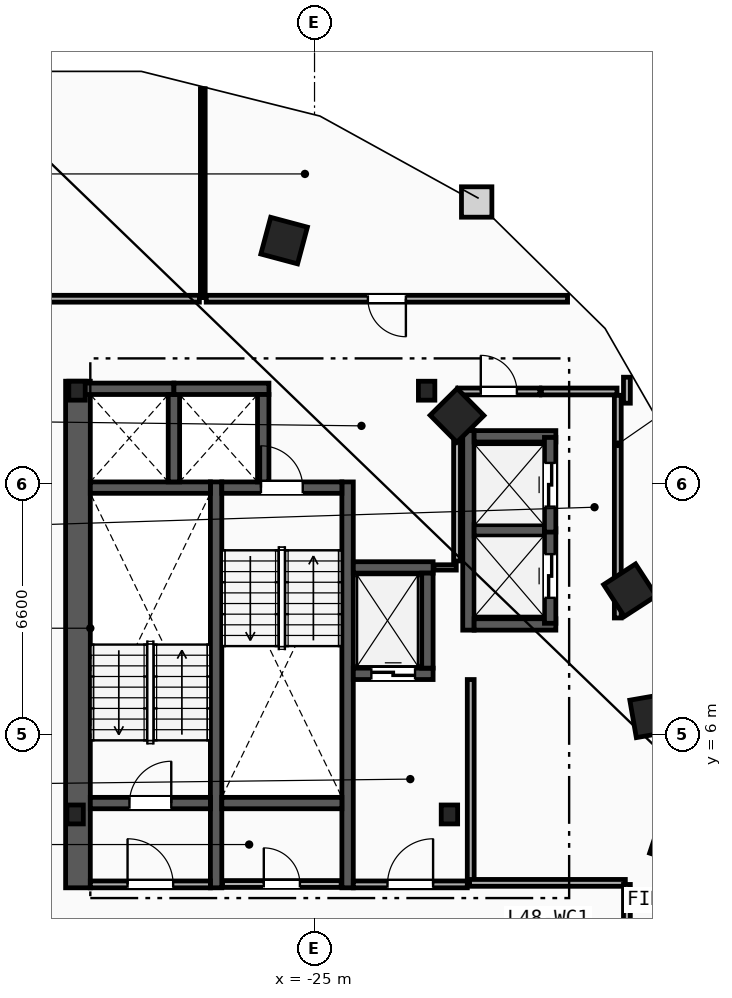
"""IFC4 building model, lengths in metres.
Left out: names, types, materials, properties, quantities, classifications, styles, units other than length and angle.
Written with IfcOpenShell. Run it as: python <this file> out.ifc"""

import sys

from ifc_helpers import new_model, si_unit, direction, frame, frame_2d, origin, origin_2d, place, context, subcontext, project, spatial, rectangle, i_section, extrude, element, fill, save


model = new_model("IFC4")
c1 = context("Model", 3, precision=1e-05, world=origin(), true_north=direction((0.0, 1.0)))
c2 = subcontext(c1, "Body", "Model", "MODEL_VIEW")
j1 = project(units=[si_unit("LENGTHUNIT", "METRE"), si_unit("PLANEANGLEUNIT", "RADIAN")], contexts=[c1])
p1 = place(None, origin())
s1 = spatial("IfcSite", under=j1, at=p1, CompositionType="ELEMENT")
p2 = place(p1, origin())
s2 = spatial("IfcBuilding", under=s1, at=p2, CompositionType="ELEMENT")
p3 = place(p2, frame((0.0, 0.0, 183.6)))
s3 = spatial("IfcBuildingStorey", under=s2, at=p3, CompositionType="ELEMENT", Elevation=183.6)
for number, where, z_axis, x_axis in (
    (1, (-31.3, 3.9, 0.0), (0.0, 0.0, 1.0), (1.0, 0.0, 0.0)),
    (2, (-21.45, 3.9, 0.0), (0.0, 0.0, 1.0), (1.0, 0.0, 0.0)),
    (3, (-22.05, 15.05, 0.0), (0.0, 0.0, 1.0), (1.0, 0.0, 0.0)),
    (4, (-31.25, 15.05, 0.0), (0.0, 0.0, 1.0), (1.0, 0.0, 0.0)),
):
    element("IfcColumn", number, at=place(p3, frame(where, z_axis=z_axis, x_axis=x_axis)), inside=s3, PredefinedType="COLUMN", context=c2, shape_type="SweptSolid", body=[
        extrude(i_section(OverallWidth=0.432, OverallDepth=0.498, WebThickness=0.056, FlangeThickness=0.089, FilletRadius=0.018, at=origin_2d()), origin(), (0.0, 0.0, 1.0), 3.6),
    ])
for number, where, z_axis, x_axis in (
    (5, (-15.55, 3.2, 0.0), (0.0, 0.0, 1.0), (0.315, 0.949, 0.0)),
    (6, (-16.125, 6.5, 0.0), (0.0, 0.0, 1.0), (-0.172, 0.985, 0.0)),
    (7, (-16.7, 9.8, 0.0), (0.0, 0.0, 1.0), (-0.544, 0.839, 0.0)),
    (8, (-21.25, 14.4, 0.0), (0.0, 0.0, 1.0), (-0.703, 0.711, 0.0)),
    (9, (-25.8, 19.0, 0.0), (0.0, 0.0, 1.0), (-0.966, 0.259, 0.0)),
):
    element("IfcColumn", number, at=place(p3, frame(where, z_axis=z_axis, x_axis=x_axis)), inside=s3, PredefinedType="COLUMN", context=c2, shape_type="SweptSolid", body=[
        extrude(rectangle(XDim=1.0, YDim=1.0, at=origin_2d()), origin(), (0.0, 0.0, 1.0), 3.6),
    ])
p4 = place(p3, frame((-31.225, 1.97, 0.0), z_axis=(0.0, 0.0, 1.0), x_axis=(0.0, 1.0, 0.0)))
e10 = element("IfcWall", 10, at=p4, inside=s3, PredefinedType="SHEAR", context=c2, shape_type="SweptSolid", body=[
    extrude(rectangle(XDim=13.33, YDim=0.65, at=frame_2d((6.665, 0.0))), origin(), (0.0, 0.0, 1.0), 3.32),
])
for number, where, z_axis, x_axis in (
    (11, (-27.59, 1.97, 0.0), (0.0, 0.0, 1.0), (0.0, 1.0, 0.0)),
    (12, (-24.13, 1.97, 0.0), (0.0, 0.0, 1.0), (0.0, 1.0, 0.0)),
):
    element("IfcWall", number, at=place(p3, frame(where, z_axis=z_axis, x_axis=x_axis)), inside=s3, PredefinedType="SHEAR", context=c2, shape_type="SweptSolid", body=[
        extrude(rectangle(XDim=10.68, YDim=0.3, at=frame_2d((5.34, 0.0))), origin(), (0.0, 0.0, 1.0), 3.32),
    ])
p5 = place(p3, frame((-30.9, 4.2, 0.0), z_axis=(0.0, 0.0, 1.0), x_axis=(1.0, 0.0, 0.0)))
e13 = element("IfcWall", 13, at=p5, inside=s3, PredefinedType="SHEAR", context=c2, shape_type="SweptSolid", body=[
    extrude(rectangle(XDim=3.16, YDim=0.3, at=frame_2d((1.58, 0.0))), origin(), (0.0, 0.0, 1.0), 3.32),
])
p6 = place(p5, frame((1.03, 0.0, 0.0)))
e14 = element("IfcOpeningElement", 14, at=p6, cuts=e13, PredefinedType="OPENING", context=c2, shape_type="SweptSolid", body=[
    extrude(rectangle(XDim=1.1, YDim=2.15, at=frame_2d((0.55, 1.075))), frame((0.0, 0.16, 0.0), z_axis=(0.0, -1.0, 0.0), x_axis=(1.0, 0.0, 0.0)), (0.0, 0.0, 1.0), 0.32),
])
p7 = place(p3, frame((-30.9, 12.5, 0.0), z_axis=(0.0, 0.0, 1.0), x_axis=(1.0, 0.0, 0.0)))
e15 = element("IfcWall", 15, at=p7, inside=s3, PredefinedType="SHEAR", context=c2, shape_type="SweptSolid", body=[
    extrude(rectangle(XDim=3.16, YDim=0.3, at=frame_2d((1.58, 0.0))), origin(), (0.0, 0.0, 1.0), 3.32),
])
p8 = place(p3, frame((-27.44, 12.5, 0.0), z_axis=(0.0, 0.0, 1.0), x_axis=(1.0, 0.0, 0.0)))
e16 = element("IfcWall", 16, at=p8, inside=s3, PredefinedType="SHEAR", context=c2, shape_type="SweptSolid", body=[
    extrude(rectangle(XDim=3.16, YDim=0.3, at=frame_2d((1.58, 0.0))), origin(), (0.0, 0.0, 1.0), 3.32),
])
p9 = place(p8, frame((1.03, 0.0, 0.0)))
e17 = element("IfcOpeningElement", 17, at=p9, cuts=e16, PredefinedType="OPENING", context=c2, shape_type="SweptSolid", body=[
    extrude(rectangle(XDim=1.1, YDim=2.15, at=frame_2d((0.55, 1.075))), frame((0.0, 0.16, 0.0), z_axis=(0.0, -1.0, 0.0), x_axis=(1.0, 0.0, 0.0)), (0.0, 0.0, 1.0), 0.32),
])
p10 = place(p3, frame((-27.44, 4.2, 0.0), z_axis=(0.0, 0.0, 1.0), x_axis=(1.0, 0.0, 0.0)))
e18 = element("IfcWall", 18, at=p10, inside=s3, PredefinedType="SHEAR", context=c2, shape_type="SweptSolid", body=[
    extrude(rectangle(XDim=3.16, YDim=0.3, at=frame_2d((1.58, 0.0))), origin(), (0.0, 0.0, 1.0), 3.32),
])
p11 = place(p3, frame((-20.89, 2.15, 0.0), z_axis=(0.0, 0.0, 1.0), x_axis=(0.0, 1.0, 0.0)))
e19 = element("IfcWall", 19, at=p11, inside=s3, PredefinedType="PARTITIONING", context=c2, shape_type="SweptSolid", body=[
    extrude(rectangle(XDim=5.3, YDim=0.18, at=frame_2d((2.65, 0.0))), origin(), (0.0, 0.0, 1.0), 3.32),
])
p12 = place(p3, frame((-23.98, 2.06, 0.0), z_axis=(0.0, 0.0, 1.0), x_axis=(1.0, 0.0, 0.0)))
e20 = element("IfcWall", 20, at=p12, inside=s3, PredefinedType="PARTITIONING", context=c2, shape_type="SweptSolid", body=[
    extrude(rectangle(XDim=3.0, YDim=0.18, at=frame_2d((1.5, 0.0))), origin(), (0.0, 0.0, 1.0), 3.32),
])
p13 = place(p12, frame((0.9, 0.0, 0.0)))
e21 = element("IfcOpeningElement", 21, at=p13, cuts=e20, PredefinedType="OPENING", context=c2, shape_type="SweptSolid", body=[
    extrude(rectangle(XDim=1.2, YDim=2.15, at=frame_2d((0.6, 1.075))), frame((0.0, 0.1, 0.0), z_axis=(0.0, -1.0, 0.0), x_axis=(1.0, 0.0, 0.0)), (0.0, 0.0, 1.0), 0.2),
])
p14 = place(p3, frame((-30.9, 2.06, 0.0), z_axis=(0.0, 0.0, 1.0), x_axis=(1.0, 0.0, 0.0)))
e22 = element("IfcWall", 22, at=p14, inside=s3, PredefinedType="PARTITIONING", context=c2, shape_type="SweptSolid", body=[
    extrude(rectangle(XDim=3.16, YDim=0.18, at=frame_2d((1.58, 0.0))), origin(), (0.0, 0.0, 1.0), 3.32),
])
p15 = place(p14, frame((0.98, 0.0, 0.0)))
e23 = element("IfcOpeningElement", 23, at=p15, cuts=e22, PredefinedType="OPENING", context=c2, shape_type="SweptSolid", body=[
    extrude(rectangle(XDim=1.2, YDim=2.15, at=frame_2d((0.6, 1.075))), frame((0.0, 0.1, 0.0), z_axis=(0.0, -1.0, 0.0), x_axis=(1.0, 0.0, 0.0)), (0.0, 0.0, 1.0), 0.2),
])
p16 = place(p3, frame((-23.98, 7.6, 0.0), z_axis=(0.0, 0.0, 1.0), x_axis=(1.0, 0.0, 0.0)))
e24 = element("IfcWall", 24, at=p16, inside=s3, PredefinedType="SHEAR", context=c2, shape_type="SweptSolid", body=[
    extrude(rectangle(XDim=2.1, YDim=0.3, at=frame_2d((1.05, 0.0))), origin(), (0.0, 0.0, 1.0), 3.32),
])
p17 = place(p16, frame((0.475, 0.0, 0.0)))
e25 = element("IfcOpeningElement", 25, at=p17, cuts=e24, PredefinedType="OPENING", context=c2, shape_type="SweptSolid", body=[
    extrude(rectangle(XDim=1.15, YDim=2.2, at=frame_2d((0.575, 1.1))), frame((0.0, 0.16, 0.0), z_axis=(0.0, -1.0, 0.0), x_axis=(1.0, 0.0, 0.0)), (0.0, 0.0, 1.0), 0.32),
])
p18 = place(p3, frame((-23.98, 10.4, 0.0), z_axis=(0.0, 0.0, 1.0), x_axis=(1.0, 0.0, 0.0)))
e26 = element("IfcWall", 26, at=p18, inside=s3, PredefinedType="SHEAR", context=c2, shape_type="SweptSolid", body=[
    extrude(rectangle(XDim=2.1, YDim=0.3, at=frame_2d((1.05, 0.0))), origin(), (0.0, 0.0, 1.0), 3.32),
])
for number, where, z_axis, x_axis in (
    (27, (-22.03, 7.75, 0.0), (0.0, 0.0, 1.0), (0.0, 1.0, 0.0)),
    (28, (-31.2, 15.1, 0.0), (0.0, 0.0, 1.0), (1.0, 0.0, 0.0)),
):
    element("IfcWall", number, at=place(p3, frame(where, z_axis=z_axis, x_axis=x_axis)), inside=s3, PredefinedType="SHEAR", context=c2, shape_type="SweptSolid", body=[
        extrude(rectangle(XDim=2.5, YDim=0.3, at=frame_2d((1.25, 0.0))), origin(), (0.0, 0.0, 1.0), 3.32),
    ])
p19 = place(p3, frame((-28.7, 12.65, 0.0), z_axis=(0.0, 0.0, 1.0), x_axis=(0.0, 1.0, 0.0)))
e29 = element("IfcWall", 29, at=p19, inside=s3, PredefinedType="SHEAR", context=c2, shape_type="SweptSolid", body=[
    extrude(rectangle(XDim=2.3, YDim=0.3, at=frame_2d((1.15, 0.0))), origin(), (0.0, 0.0, 1.0), 3.32),
])
p20 = place(p3, frame((-28.7, 15.1, 0.0), z_axis=(0.0, 0.0, 1.0), x_axis=(1.0, 0.0, 0.0)))
e30 = element("IfcWall", 30, at=p20, inside=s3, PredefinedType="SHEAR", context=c2, shape_type="SweptSolid", body=[
    extrude(rectangle(XDim=2.5, YDim=0.3, at=frame_2d((1.25, 0.0))), origin(), (0.0, 0.0, 1.0), 3.32),
])
p21 = place(p3, frame((-26.35, 12.65, 0.0), z_axis=(0.0, 0.0, 1.0), x_axis=(0.0, 1.0, 0.0)))
e31 = element("IfcWall", 31, at=p21, inside=s3, PredefinedType="SHEAR", context=c2, shape_type="SweptSolid", body=[
    extrude(rectangle(XDim=2.3, YDim=0.3, at=frame_2d((1.15, 0.0))), origin(), (0.0, 0.0, 1.0), 3.32),
])
p22 = place(p3, frame((-20.95, 8.75, 0.0), z_axis=(0.0, 0.0, 1.0), x_axis=(0.0, 1.0, 0.0)))
e32 = element("IfcWall", 32, at=p22, inside=s3, PredefinedType="SHEAR", context=c2, shape_type="SweptSolid", body=[
    extrude(rectangle(XDim=5.25, YDim=0.3, at=frame_2d((2.625, 0.0))), origin(), (0.0, 0.0, 1.0), 3.32),
])
for number, where, z_axis, x_axis in (
    (33, (-20.8, 8.9, 0.0), (0.0, 0.0, 1.0), (1.0, 0.0, 0.0)),
    (34, (-20.8, 13.85, 0.0), (0.0, 0.0, 1.0), (1.0, 0.0, 0.0)),
):
    element("IfcWall", number, at=place(p3, frame(where, z_axis=z_axis, x_axis=x_axis)), inside=s3, PredefinedType="SHEAR", context=c2, shape_type="SweptSolid", body=[
        extrude(rectangle(XDim=2.15, YDim=0.3, at=frame_2d((1.075, 0.0))), origin(), (0.0, 0.0, 1.0), 3.32),
    ])
p23 = place(p3, frame((-20.8, 11.375, 0.0), z_axis=(0.0, 0.0, 1.0), x_axis=(1.0, 0.0, 0.0)))
e35 = element("IfcWall", 35, at=p23, inside=s3, PredefinedType="SHEAR", context=c2, shape_type="SweptSolid", body=[
    extrude(rectangle(XDim=1.85, YDim=0.3, at=frame_2d((0.925, 0.0))), origin(), (0.0, 0.0, 1.0), 3.32),
])
p24 = place(p3, frame((-18.8, 8.93, 0.0), z_axis=(0.0, 0.0, 1.0), x_axis=(0.0, 1.0, 0.0)))
e36 = element("IfcWall", 36, at=p24, inside=s3, PredefinedType="SHEAR", context=c2, shape_type="SweptSolid", body=[
    extrude(rectangle(XDim=2.49, YDim=0.3, at=frame_2d((1.245, 0.0))), origin(), (0.0, 0.0, 1.0), 3.32),
])
p25 = place(p24, frame((0.67, 0.0, 0.0)))
e37 = element("IfcOpeningElement", 37, at=p25, cuts=e36, PredefinedType="OPENING", context=c2, shape_type="SweptSolid", body=[
    extrude(rectangle(XDim=1.15, YDim=2.2, at=frame_2d((0.575, 1.1))), frame((0.0, 0.16, 0.0), z_axis=(0.0, -1.0, 0.0), x_axis=(1.0, 0.0, 0.0)), (0.0, 0.0, 1.0), 0.32),
])
p26 = place(p3, frame((-18.8, 11.33, 0.0), z_axis=(0.0, 0.0, 1.0), x_axis=(0.0, 1.0, 0.0)))
e38 = element("IfcWall", 38, at=p26, inside=s3, PredefinedType="SHEAR", context=c2, shape_type="SweptSolid", body=[
    extrude(rectangle(XDim=2.49, YDim=0.3, at=frame_2d((1.245, 0.0))), origin(), (0.0, 0.0, 1.0), 3.32),
])
p27 = place(p26, frame((0.67, 0.0, 0.0)))
e39 = element("IfcOpeningElement", 39, at=p27, cuts=e38, PredefinedType="OPENING", context=c2, shape_type="SweptSolid", body=[
    extrude(rectangle(XDim=1.15, YDim=2.2, at=frame_2d((0.575, 1.1))), frame((0.0, 0.16, 0.0), z_axis=(0.0, -1.0, 0.0), x_axis=(1.0, 0.0, 0.0)), (0.0, 0.0, 1.0), 0.32),
])
p28 = place(p3, frame((-17.02, 9.07, 0.0), z_axis=(0.0, 0.0, 1.0), x_axis=(0.0, 1.0, 0.0)))
e40 = element("IfcWall", 40, at=p28, inside=s3, PredefinedType="PARTITIONING", context=c2, shape_type="SweptSolid", body=[
    extrude(rectangle(XDim=5.86, YDim=0.18, at=frame_2d((2.93, 0.0))), origin(), (0.0, 0.0, 1.0), 3.32),
])
p29 = place(p3, frame((-21.23, 15.03, 0.0), z_axis=(0.0, 0.0, 1.0), x_axis=(1.0, 0.0, 0.0)))
e41 = element("IfcWall", 41, at=p29, inside=s3, PredefinedType="PARTITIONING", context=c2, shape_type="SweptSolid", body=[
    extrude(rectangle(XDim=2.16, YDim=0.18, at=frame_2d((1.08, 0.0))), origin(), (0.0, 0.0, 1.0), 3.32),
])
p30 = place(p29, frame((0.605, 0.0, 0.0)))
e42 = element("IfcOpeningElement", 42, at=p30, cuts=e41, PredefinedType="OPENING", context=c2, shape_type="SweptSolid", body=[
    extrude(rectangle(XDim=0.95, YDim=2.1, at=frame_2d((0.475, 1.05))), frame((0.0, 0.1, 0.0), z_axis=(0.0, -1.0, 0.0), x_axis=(1.0, 0.0, 0.0)), (0.0, 0.0, 1.0), 0.2),
])
p31 = place(p3, frame((-19.03, 15.03, 0.0), z_axis=(0.0, 0.0, 1.0), x_axis=(1.0, 0.0, 0.0)))
e43 = element("IfcWall", 43, at=p31, inside=s3, PredefinedType="PARTITIONING", context=c2, shape_type="SweptSolid", body=[
    extrude(rectangle(XDim=1.99, YDim=0.18, at=frame_2d((0.995, 0.0))), origin(), (0.0, 0.0, 1.0), 3.32),
])
p32 = place(p3, frame((-21.86, 10.4, 0.0), z_axis=(0.0, 0.0, 1.0), x_axis=(1.0, 0.0, 0.0)))
e44 = element("IfcWall", 44, at=p32, inside=s3, PredefinedType="PARTITIONING", context=c2, shape_type="SweptSolid", body=[
    extrude(rectangle(XDim=0.59, YDim=0.14, at=frame_2d((0.295, 0.0))), origin(), (0.0, 0.0, 1.0), 3.32),
])
p33 = place(p3, frame((-21.25, 10.57, 0.0), z_axis=(0.0, 0.0, 1.0), x_axis=(0.0, 1.0, 0.0)))
e45 = element("IfcWall", 45, at=p33, inside=s3, PredefinedType="PARTITIONING", context=c2, shape_type="SweptSolid", body=[
    extrude(rectangle(XDim=4.36, YDim=0.18, at=frame_2d((2.18, 0.0))), origin(), (0.0, 0.0, 1.0), 3.32),
])
p34 = place(p3, frame((-27.42, 2.07, 0.0), z_axis=(0.0, 0.0, 1.0), x_axis=(1.0, 0.0, 0.0)))
e46 = element("IfcWall", 46, at=p34, inside=s3, PredefinedType="PARTITIONING", context=c2, shape_type="SweptSolid", body=[
    extrude(rectangle(XDim=3.12, YDim=0.18, at=frame_2d((1.56, 0.0))), origin(), (0.0, 0.0, 1.0), 3.32),
])
p35 = place(p34, frame((1.085, 0.0, 0.0)))
e47 = element("IfcOpeningElement", 47, at=p35, cuts=e46, PredefinedType="OPENING", context=c2, shape_type="SweptSolid", body=[
    extrude(rectangle(XDim=0.95, YDim=2.1, at=frame_2d((0.475, 1.05))), frame((0.0, 0.1, 0.0), z_axis=(0.0, -1.0, 0.0), x_axis=(1.0, 0.0, 0.0)), (0.0, 0.0, 1.0), 0.2),
])
p36 = place(p3, frame((-27.94, 17.5, 0.0), z_axis=(0.0, 0.0, 1.0), x_axis=(0.0, 1.0, 0.0)))
e48 = element("IfcWall", 48, at=p36, inside=s3, PredefinedType="PARTITIONING", context=c2, shape_type="SweptSolid", body=[
    extrude(rectangle(XDim=5.497, YDim=0.125, at=frame_2d((2.748, 0.0))), origin(), (0.0, 0.0, 1.0), 3.32),
])
p37 = place(p3, frame((-28.03, 17.47, 0.0), z_axis=(0.0, 0.0, 1.0), x_axis=(-1.0, 0.0, 0.0)))
e49 = element("IfcWall", 49, at=p37, inside=s3, PredefinedType="PARTITIONING", context=c2, shape_type="SweptSolid", body=[
    extrude(rectangle(XDim=5.598, YDim=0.18, at=frame_2d((2.799, 0.0))), origin(), (0.0, 0.0, 1.0), 3.32),
])
p38 = place(p3, frame((-16.822, 2.1, 0.0), z_axis=(0.0, 0.0, 1.0), x_axis=(-1.0, 0.0, 0.0)))
e50 = element("IfcWall", 50, at=p38, inside=s3, PredefinedType="PARTITIONING", context=c2, shape_type="SweptSolid", body=[
    extrude(rectangle(XDim=4.098, YDim=0.18, at=frame_2d((2.049, 0.0))), origin(), (0.0, 0.0, 1.0), 3.32),
])
p39 = place(p3, frame((-16.78, -0.329, 0.0), z_axis=(0.0, 0.0, 1.0), x_axis=(0.0, 1.0, 0.0)))
e51 = element("IfcWall", 51, at=p39, inside=s3, PredefinedType="PARTITIONING", context=c2, shape_type="SweptSolid", body=[
    extrude(rectangle(XDim=2.387, YDim=0.18, at=frame_2d((1.194, 0.0))), origin(), (0.0, 0.0, 1.0), 3.32),
])
p40 = place(p3, frame((-16.78, 14.721, 0.0), z_axis=(0.0, 0.0, 1.0), x_axis=(0.0, 1.0, 0.0)))
e52 = element("IfcWall", 52, at=p40, inside=s3, PredefinedType="PARTITIONING", context=c2, shape_type="SweptSolid", body=[
    extrude(rectangle(XDim=0.684, YDim=0.18, at=frame_2d((0.342, 0.0))), origin(), (0.0, 0.0, 1.0), 3.32),
])
p41 = place(p3, frame((-18.342, 17.47, 0.0), z_axis=(0.0, 0.0, 1.0), x_axis=(-1.0, 0.0, 0.0)))
e53 = element("IfcWall", 53, at=p41, inside=s3, PredefinedType="PARTITIONING", context=c2, shape_type="SweptSolid", body=[
    extrude(rectangle(XDim=9.508, YDim=0.18, at=frame_2d((4.754, 0.0))), origin(), (0.0, 0.0, 1.0), 3.32),
])
p42 = place(p41, frame((4.254, 0.0, 0.0)))
e54 = element("IfcOpeningElement", 54, at=p42, cuts=e53, PredefinedType="OPENING", context=c2, shape_type="SweptSolid", body=[
    extrude(rectangle(XDim=1.0, YDim=2.15, at=frame_2d((0.5, 1.075))), frame((0.0, 0.1, 0.0), z_axis=(0.0, -1.0, 0.0), x_axis=(1.0, 0.0, 0.0)), (0.0, 0.0, 1.0), 0.2),
])
p43 = place(p6, origin())
e55 = element("IfcDoor", 55, at=p43, inside=s3, OperationType="SINGLE_SWING_RIGHT", PredefinedType="DOOR", context=c2, shape_type="SweptSolid", body=[
    extrude(rectangle(XDim=1.1, YDim=2.15, at=frame_2d((0.55, 1.075))), frame((0.0, 0.025, 0.0), z_axis=(0.0, -1.0, 0.0), x_axis=(1.0, 0.0, 0.0)), (0.0, 0.0, 1.0), 0.05),
])
fill(e14, e55)
p44 = place(p9, origin())
e56 = element("IfcDoor", 56, at=p44, inside=s3, OperationType="SINGLE_SWING_LEFT", PredefinedType="DOOR", context=c2, shape_type="SweptSolid", body=[
    extrude(rectangle(XDim=1.1, YDim=2.15, at=frame_2d((0.55, 1.075))), frame((0.0, 0.025, 0.0), z_axis=(0.0, -1.0, 0.0), x_axis=(1.0, 0.0, 0.0)), (0.0, 0.0, 1.0), 0.05),
])
fill(e17, e56)
p45 = place(p13, origin())
e57 = element("IfcDoor", 57, at=p45, inside=s3, OperationType="SINGLE_SWING_RIGHT", PredefinedType="DOOR", context=c2, shape_type="SweptSolid", body=[
    extrude(rectangle(XDim=1.2, YDim=2.15, at=frame_2d((0.6, 1.075))), frame((0.0, 0.025, 0.0), z_axis=(0.0, -1.0, 0.0), x_axis=(1.0, 0.0, 0.0)), (0.0, 0.0, 1.0), 0.05),
])
fill(e21, e57)
p46 = place(p15, origin())
e58 = element("IfcDoor", 58, at=p46, inside=s3, OperationType="SINGLE_SWING_LEFT", PredefinedType="DOOR", context=c2, shape_type="SweptSolid", body=[
    extrude(rectangle(XDim=1.2, YDim=2.15, at=frame_2d((0.6, 1.075))), frame((0.0, 0.025, 0.0), z_axis=(0.0, -1.0, 0.0), x_axis=(1.0, 0.0, 0.0)), (0.0, 0.0, 1.0), 0.05),
])
fill(e23, e58)
p47 = place(p17, origin())
e59 = element("IfcDoor", 59, at=p47, inside=s3, OperationType="SLIDING_TO_LEFT", PredefinedType="TRAPDOOR", context=c2, shape_type="SweptSolid", body=[
    extrude(rectangle(XDim=1.15, YDim=2.2, at=frame_2d((0.575, 1.1))), frame((0.0, 0.025, 0.0), z_axis=(0.0, -1.0, 0.0), x_axis=(1.0, 0.0, 0.0)), (0.0, 0.0, 1.0), 0.05),
])
fill(e25, e59)
p48 = place(p25, origin())
e60 = element("IfcDoor", 60, at=p48, inside=s3, OperationType="SLIDING_TO_LEFT", PredefinedType="TRAPDOOR", context=c2, shape_type="SweptSolid", body=[
    extrude(rectangle(XDim=1.15, YDim=2.2, at=frame_2d((0.575, 1.1))), frame((0.0, 0.025, 0.0), z_axis=(0.0, -1.0, 0.0), x_axis=(1.0, 0.0, 0.0)), (0.0, 0.0, 1.0), 0.05),
])
fill(e37, e60)
p49 = place(p27, origin())
e61 = element("IfcDoor", 61, at=p49, inside=s3, OperationType="SLIDING_TO_LEFT", PredefinedType="TRAPDOOR", context=c2, shape_type="SweptSolid", body=[
    extrude(rectangle(XDim=1.15, YDim=2.2, at=frame_2d((0.575, 1.1))), frame((0.0, 0.025, 0.0), z_axis=(0.0, -1.0, 0.0), x_axis=(1.0, 0.0, 0.0)), (0.0, 0.0, 1.0), 0.05),
])
fill(e39, e61)
p50 = place(p42, origin())
e62 = element("IfcDoor", 62, at=p50, inside=s3, OperationType="SINGLE_SWING_LEFT", PredefinedType="DOOR", context=c2, shape_type="SweptSolid", body=[
    extrude(rectangle(XDim=1.0, YDim=2.15, at=frame_2d((0.5, 1.075))), frame((0.0, 0.025, 0.0), z_axis=(0.0, -1.0, 0.0), x_axis=(1.0, 0.0, 0.0)), (0.0, 0.0, 1.0), 0.05),
])
fill(e54, e62)
p51 = place(p35, origin())
e63 = element("IfcDoor", 63, at=p51, inside=s3, OperationType="SINGLE_SWING_LEFT", PredefinedType="DOOR", context=c2, shape_type="SweptSolid", body=[
    extrude(rectangle(XDim=0.95, YDim=2.1, at=frame_2d((0.475, 1.05))), frame((0.0, 0.025, 0.0), z_axis=(0.0, -1.0, 0.0), x_axis=(1.0, 0.0, 0.0)), (0.0, 0.0, 1.0), 0.05),
])
fill(e47, e63)
p52 = place(p30, origin())
e64 = element("IfcDoor", 64, at=p52, inside=s3, OperationType="SINGLE_SWING_LEFT", PredefinedType="DOOR", context=c2, shape_type="SweptSolid", body=[
    extrude(rectangle(XDim=0.95, YDim=2.1, at=frame_2d((0.475, 1.05))), frame((0.0, 0.025, 0.0), z_axis=(0.0, -1.0, 0.0), x_axis=(1.0, 0.0, 0.0)), (0.0, 0.0, 1.0), 0.05),
])
fill(e42, e64)
save(model, sys.argv[1])
